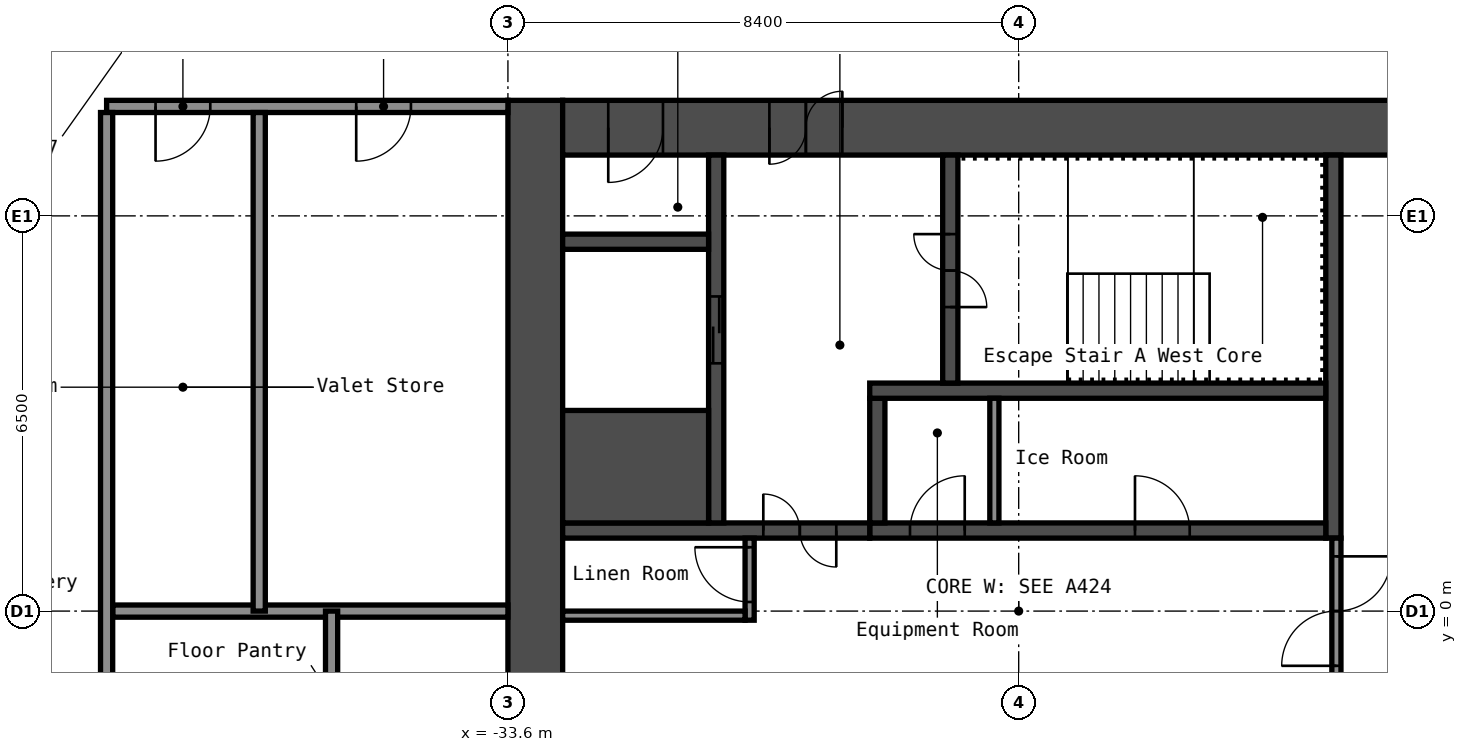
"""IFC4 building model, lengths in metres.
Left out: names, types, materials, properties, quantities, classifications, styles, units other than length and angle.
Written with IfcOpenShell. Run it as: python <this file> out.ifc"""

import sys

from ifc_helpers import new_model, si_unit, direction, frame, frame_2d, origin, place, context, subcontext, project, spatial, rectangle, extrude, element, fill, save


model = new_model("IFC4")
c1 = context("Model", 3, precision=1e-05, world=origin(), true_north=direction((0.0, 1.0)))
c2 = subcontext(c1, "Body", "Model", "MODEL_VIEW")
j1 = project(units=[si_unit("LENGTHUNIT", "METRE"), si_unit("PLANEANGLEUNIT", "RADIAN")], contexts=[c1])
p1 = place(None, origin())
s1 = spatial("IfcSite", under=j1, at=p1, CompositionType="ELEMENT")
p2 = place(p1, origin())
s2 = spatial("IfcBuilding", under=s1, at=p2, CompositionType="ELEMENT")
p3 = place(p2, frame((0.0, 0.0, 169.4)))
s3 = spatial("IfcBuildingStorey", under=s2, at=p3, CompositionType="ELEMENT", Elevation=169.4)
p4 = place(p3, frame((-33.15, -8.4, 0.0), z_axis=(0.0, 0.0, 1.0), x_axis=(0.0, 1.0, 0.0)))
e1 = element("IfcWall", 1, at=p4, inside=s3, PredefinedType="SHEAR", context=c2, shape_type="SweptSolid", body=[
    extrude(rectangle(XDim=16.8, YDim=0.9, at=frame_2d((8.4, 0.0))), origin(), (0.0, 0.0, 1.0), 2.75),
])
p5 = place(p3, frame((-32.7, 7.95, 0.0), z_axis=(0.0, 0.0, 1.0), x_axis=(1.0, 0.0, 0.0)))
e2 = element("IfcWall", 2, at=p5, inside=s3, PredefinedType="SHEAR", context=c2, shape_type="SweptSolid", body=[
    extrude(rectangle(XDim=15.0, YDim=0.9, at=frame_2d((7.5, 0.0))), origin(), (0.0, 0.0, 1.0), 2.75),
])
p6 = place(p5, frame((3.4, 0.0, 0.0)))
e3 = element("IfcOpeningElement", 3, at=p6, cuts=e2, PredefinedType="OPENING", context=c2, shape_type="SweptSolid", body=[
    extrude(rectangle(XDim=1.2, YDim=2.1, at=frame_2d((0.6, 1.05))), frame((0.0, 0.46, 0.0), z_axis=(0.0, -1.0, 0.0), x_axis=(1.0, 0.0, 0.0)), (0.0, 0.0, 1.0), 0.92),
])
p7 = place(p5, frame((0.75, 0.0, 0.0)))
e4 = element("IfcOpeningElement", 4, at=p7, cuts=e2, PredefinedType="OPENING", context=c2, shape_type="SweptSolid", body=[
    extrude(rectangle(XDim=0.9, YDim=2.1, at=frame_2d((0.45, 1.05))), frame((0.0, 0.46, 0.0), z_axis=(0.0, -1.0, 0.0), x_axis=(1.0, 0.0, 0.0)), (0.0, 0.0, 1.0), 0.92),
])
p8 = place(p3, frame((-20.025, 1.2, 0.0), z_axis=(0.0, 0.0, 1.0), x_axis=(0.0, 1.0, 0.0)))
e5 = element("IfcWall", 5, at=p8, inside=s3, PredefinedType="SHEAR", context=c2, shape_type="SweptSolid", body=[
    extrude(rectangle(XDim=6.3, YDim=0.25, at=frame_2d((3.15, 0.0))), origin(), (0.0, 0.0, 1.0), 2.75),
])
p9 = place(p3, frame((-27.65, 1.325, 0.0), z_axis=(0.0, 0.0, 1.0), x_axis=(1.0, 0.0, 0.0)))
e6 = element("IfcWall", 6, at=p9, inside=s3, PredefinedType="SHEAR", context=c2, shape_type="SweptSolid", body=[
    extrude(rectangle(XDim=7.5, YDim=0.25, at=frame_2d((3.75, 0.0))), origin(), (0.0, 0.0, 1.0), 2.75),
])
p10 = place(p9, frame((4.363, 0.0, 0.0)))
e7 = element("IfcOpeningElement", 7, at=p10, cuts=e6, PredefinedType="OPENING", context=c2, shape_type="SweptSolid", body=[
    extrude(rectangle(XDim=0.9, YDim=2.1, at=frame_2d((0.45, 1.05))), frame((0.0, 0.135, 0.0), z_axis=(0.0, -1.0, 0.0), x_axis=(1.0, 0.0, 0.0)), (0.0, 0.0, 1.0), 0.27),
])
p11 = place(p9, frame((0.663, 0.0, 0.0)))
e8 = element("IfcOpeningElement", 8, at=p11, cuts=e6, PredefinedType="OPENING", context=c2, shape_type="SweptSolid", body=[
    extrude(rectangle(XDim=0.9, YDim=2.1, at=frame_2d((0.45, 1.05))), frame((0.0, 0.135, 0.0), z_axis=(0.0, -1.0, 0.0), x_axis=(1.0, 0.0, 0.0)), (0.0, 0.0, 1.0), 0.27),
])
p12 = place(p3, frame((-27.525, 1.45, 0.0), z_axis=(0.0, 0.0, 1.0), x_axis=(0.0, 1.0, 0.0)))
e9 = element("IfcWall", 9, at=p12, inside=s3, PredefinedType="SHEAR", context=c2, shape_type="SweptSolid", body=[
    extrude(rectangle(XDim=2.05, YDim=0.25, at=frame_2d((1.025, 0.0))), origin(), (0.0, 0.0, 1.0), 2.75),
])
p13 = place(p3, frame((-27.65, 3.625, 0.0), z_axis=(0.0, 0.0, 1.0), x_axis=(1.0, 0.0, 0.0)))
e10 = element("IfcWall", 10, at=p13, inside=s3, PredefinedType="SHEAR", context=c2, shape_type="SweptSolid", body=[
    extrude(rectangle(XDim=7.5, YDim=0.25, at=frame_2d((3.75, 0.0))), origin(), (0.0, 0.0, 1.0), 2.75),
])
p14 = place(p3, frame((-26.325, 3.75, 0.0), z_axis=(0.0, 0.0, 1.0), x_axis=(0.0, 1.0, 0.0)))
e11 = element("IfcWall", 11, at=p14, inside=s3, PredefinedType="SHEAR", context=c2, shape_type="SweptSolid", body=[
    extrude(rectangle(XDim=3.75, YDim=0.25, at=frame_2d((1.875, 0.0))), origin(), (0.0, 0.0, 1.0), 2.75),
])
p15 = place(p14, frame((1.25, 0.0, 0.0)))
e12 = element("IfcOpeningElement", 12, at=p15, cuts=e11, PredefinedType="OPENING", context=c2, shape_type="SweptSolid", body=[
    extrude(rectangle(XDim=1.2, YDim=2.1, at=frame_2d((0.6, 1.05))), frame((0.0, 0.135, 0.0), z_axis=(0.0, -1.0, 0.0), x_axis=(1.0, 0.0, 0.0)), (0.0, 0.0, 1.0), 0.27),
])
p16 = place(p3, frame((-32.7, 1.325, 0.0), z_axis=(0.0, 0.0, 1.0), x_axis=(1.0, 0.0, 0.0)))
e13 = element("IfcWall", 13, at=p16, inside=s3, PredefinedType="SHEAR", context=c2, shape_type="SweptSolid", body=[
    extrude(rectangle(XDim=5.05, YDim=0.25, at=frame_2d((2.525, 0.0))), origin(), (0.0, 0.0, 1.0), 2.75),
])
p17 = place(p16, frame((3.3, 0.0, 0.0)))
e14 = element("IfcOpeningElement", 14, at=p17, cuts=e13, PredefinedType="OPENING", context=c2, shape_type="SweptSolid", body=[
    extrude(rectangle(XDim=1.2, YDim=2.1, at=frame_2d((0.6, 1.05))), frame((0.0, 0.135, 0.0), z_axis=(0.0, -1.0, 0.0), x_axis=(1.0, 0.0, 0.0)), (0.0, 0.0, 1.0), 0.27),
])
p18 = place(p3, frame((-30.175, 1.45, 0.0), z_axis=(0.0, 0.0, 1.0), x_axis=(0.0, 1.0, 0.0)))
e15 = element("IfcWall", 15, at=p18, inside=s3, PredefinedType="SHEAR", context=c2, shape_type="SweptSolid", body=[
    extrude(rectangle(XDim=6.05, YDim=0.25, at=frame_2d((3.025, 0.0))), origin(), (0.0, 0.0, 1.0), 2.75),
])
p19 = place(p18, frame((2.625, 0.0, 0.0)))
e16 = element("IfcOpeningElement", 16, at=p19, cuts=e15, PredefinedType="OPENING", context=c2, shape_type="SweptSolid", body=[
    extrude(rectangle(XDim=1.1, YDim=2.1, at=frame_2d((0.55, 1.05))), frame((0.0, 0.135, 0.0), z_axis=(0.0, -1.0, 0.0), x_axis=(1.0, 0.0, 0.0)), (0.0, 0.0, 1.0), 0.27),
])
p20 = place(p3, frame((-32.7, 2.375, 0.0), z_axis=(0.0, 0.0, 1.0), x_axis=(1.0, 0.0, 0.0)))
e17 = element("IfcWall", 17, at=p20, inside=s3, PredefinedType="SHEAR", context=c2, shape_type="SweptSolid", body=[
    extrude(rectangle(XDim=2.4, YDim=1.85, at=frame_2d((1.2, 0.0))), origin(), (0.0, 0.0, 1.0), 2.75),
])
p21 = place(p3, frame((-32.7, 6.075, 0.0), z_axis=(0.0, 0.0, 1.0), x_axis=(1.0, 0.0, 0.0)))
e18 = element("IfcWall", 18, at=p21, inside=s3, PredefinedType="SHEAR", context=c2, shape_type="SweptSolid", body=[
    extrude(rectangle(XDim=2.4, YDim=0.25, at=frame_2d((1.2, 0.0))), origin(), (0.0, 0.0, 1.0), 2.75),
])
p22 = place(p3, frame((-19.975, -1.2, 0.0), z_axis=(0.0, 0.0, 1.0), x_axis=(0.0, 1.0, 0.0)))
e19 = element("IfcWall", 19, at=p22, inside=s3, PredefinedType="PARTITIONING", context=c2, shape_type="SweptSolid", body=[
    extrude(rectangle(XDim=2.4, YDim=0.15, at=frame_2d((1.2, 0.0))), origin(), (0.0, 0.0, 1.0), 2.75),
])
p23 = place(p22, frame((0.3, 0.0, 0.0)))
e20 = element("IfcOpeningElement", 20, at=p23, cuts=e19, PredefinedType="OPENING", context=c2, shape_type="SweptSolid", body=[
    extrude(rectangle(XDim=1.8, YDim=2.1, at=frame_2d((0.9, 1.05))), frame((0.0, 0.085, 0.0), z_axis=(0.0, -1.0, 0.0), x_axis=(1.0, 0.0, 0.0)), (0.0, 0.0, 1.0), 0.17),
])
p24 = place(p3, frame((-29.625, -0.15, 0.0), z_axis=(0.0, 0.0, 1.0), x_axis=(0.0, 1.0, 0.0)))
e21 = element("IfcWall", 21, at=p24, inside=s3, PredefinedType="PARTITIONING", context=c2, shape_type="SweptSolid", body=[
    extrude(rectangle(XDim=1.35, YDim=0.15, at=frame_2d((0.675, 0.0))), origin(), (0.0, 0.0, 1.0), 2.75),
])
p25 = place(p24, frame((0.3, 0.0, 0.0)))
e22 = element("IfcOpeningElement", 22, at=p25, cuts=e21, PredefinedType="OPENING", context=c2, shape_type="SweptSolid", body=[
    extrude(rectangle(XDim=0.9, YDim=2.1, at=frame_2d((0.45, 1.05))), frame((0.0, 0.085, 0.0), z_axis=(0.0, -1.0, 0.0), x_axis=(1.0, 0.0, 0.0)), (0.0, 0.0, 1.0), 0.17),
])
p26 = place(p3, frame((-32.7, -0.075, 0.0), z_axis=(0.0, 0.0, 1.0), x_axis=(1.0, 0.0, 0.0)))
e23 = element("IfcWall", 23, at=p26, inside=s3, PredefinedType="PARTITIONING", context=c2, shape_type="SweptSolid", body=[
    extrude(rectangle(XDim=3.0, YDim=0.15, at=frame_2d((1.5, 0.0))), origin(), (0.0, 0.0, 1.0), 2.75),
])
p27 = place(p3, frame((-25.6, 1.45, 0.0), z_axis=(0.0, 0.0, 1.0), x_axis=(0.0, 1.0, 0.0)))
e24 = element("IfcWall", 24, at=p27, inside=s3, PredefinedType="PARTITIONING", context=c2, shape_type="SweptSolid", body=[
    extrude(rectangle(XDim=2.05, YDim=0.15, at=frame_2d((1.025, 0.0))), origin(), (0.0, 0.0, 1.0), 2.75),
])
p28 = place(p3, frame((-40.1, 0.0, 0.0), z_axis=(0.0, 0.0, 1.0), x_axis=(1.0, 0.0, 0.0)))
e25 = element("IfcWall", 25, at=p28, inside=s3, PredefinedType="PARTITIONING", context=c2, shape_type="SweptSolid", body=[
    extrude(rectangle(XDim=6.5, YDim=0.2, at=frame_2d((3.25, 0.0))), origin(), (0.0, 0.0, 1.0), 2.75),
])
p29 = place(p3, frame((-40.2, 8.3, 0.0), z_axis=(0.0, 0.0, 1.0), x_axis=(1.0, 0.0, 0.0)))
e26 = element("IfcWall", 26, at=p29, inside=s3, PredefinedType="PARTITIONING", context=c2, shape_type="SweptSolid", body=[
    extrude(rectangle(XDim=6.6, YDim=0.2, at=frame_2d((3.3, 0.0))), origin(), (0.0, 0.0, 1.0), 2.75),
])
p30 = place(p29, frame((0.805, 0.0, 0.0)))
e27 = element("IfcOpeningElement", 27, at=p30, cuts=e26, PredefinedType="OPENING", context=c2, shape_type="SweptSolid", body=[
    extrude(rectangle(XDim=0.9, YDim=2.1, at=frame_2d((0.45, 1.05))), frame((0.0, 0.11, 0.0), z_axis=(0.0, -1.0, 0.0), x_axis=(1.0, 0.0, 0.0)), (0.0, 0.0, 1.0), 0.22),
])
p31 = place(p29, frame((4.105, 0.0, 0.0)))
e28 = element("IfcOpeningElement", 28, at=p31, cuts=e26, PredefinedType="OPENING", context=c2, shape_type="SweptSolid", body=[
    extrude(rectangle(XDim=0.9, YDim=2.1, at=frame_2d((0.45, 1.05))), frame((0.0, 0.11, 0.0), z_axis=(0.0, -1.0, 0.0), x_axis=(1.0, 0.0, 0.0)), (0.0, 0.0, 1.0), 0.22),
])
p32 = place(p3, frame((-40.2, -8.2, 0.0), z_axis=(0.0, 0.0, 1.0), x_axis=(0.0, 1.0, 0.0)))
e29 = element("IfcWall", 29, at=p32, inside=s3, PredefinedType="PARTITIONING", context=c2, shape_type="SweptSolid", body=[
    extrude(rectangle(XDim=16.4, YDim=0.2, at=frame_2d((8.2, 0.0))), origin(), (0.0, 0.0, 1.0), 2.75),
])
for number, where, z_axis, x_axis in (
    (30, (-37.69, 0.0, 0.0), (0.0, 0.0, 1.0), (0.0, 1.0, 0.0)),
    (31, (-36.5, -8.2, 0.0), (0.0, 0.0, 1.0), (0.0, 1.0, 0.0)),
):
    element("IfcWall", number, at=place(p3, frame(where, z_axis=z_axis, x_axis=x_axis)), inside=s3, PredefinedType="PARTITIONING", context=c2, shape_type="SweptSolid", body=[
        extrude(rectangle(XDim=8.2, YDim=0.2, at=frame_2d((4.1, 0.0))), origin(), (0.0, 0.0, 1.0), 2.75),
    ])
p33 = place(p6, origin())
e32 = element("IfcDoor", 32, at=p33, inside=s3, OperationType="DOUBLE_DOOR_SINGLE_SWING", PredefinedType="DOOR", context=c2, shape_type="SweptSolid", body=[
    extrude(rectangle(XDim=1.2, YDim=2.1, at=frame_2d((0.6, 1.05))), frame((0.0, 0.025, 0.0), z_axis=(0.0, -1.0, 0.0), x_axis=(1.0, 0.0, 0.0)), (0.0, 0.0, 1.0), 0.05),
])
fill(e3, e32)
p34 = place(p7, origin())
e33 = element("IfcDoor", 33, at=p34, inside=s3, OperationType="SINGLE_SWING_LEFT", PredefinedType="DOOR", context=c2, shape_type="SweptSolid", body=[
    extrude(rectangle(XDim=0.9, YDim=2.1, at=frame_2d((0.45, 1.05))), frame((0.0, 0.025, 0.0), z_axis=(0.0, -1.0, 0.0), x_axis=(1.0, 0.0, 0.0)), (0.0, 0.0, 1.0), 0.05),
])
fill(e4, e33)
p35 = place(p15, origin())
e34 = element("IfcDoor", 34, at=p35, inside=s3, OperationType="DOUBLE_DOOR_SINGLE_SWING", PredefinedType="DOOR", context=c2, shape_type="SweptSolid", body=[
    extrude(rectangle(XDim=1.2, YDim=2.1, at=frame_2d((0.6, 1.05))), frame((0.0, 0.025, 0.0), z_axis=(0.0, -1.0, 0.0), x_axis=(1.0, 0.0, 0.0)), (0.0, 0.0, 1.0), 0.05),
])
fill(e12, e34)
p36 = place(p17, origin())
e35 = element("IfcDoor", 35, at=p36, inside=s3, OperationType="DOUBLE_DOOR_SINGLE_SWING", PredefinedType="DOOR", context=c2, shape_type="SweptSolid", body=[
    extrude(rectangle(XDim=1.2, YDim=2.1, at=frame_2d((0.6, 1.05))), frame((0.0, 0.025, 0.0), z_axis=(0.0, -1.0, 0.0), x_axis=(1.0, 0.0, 0.0)), (0.0, 0.0, 1.0), 0.05),
])
fill(e14, e35)
p37 = place(p23, origin())
e36 = element("IfcDoor", 36, at=p37, inside=s3, OperationType="DOUBLE_DOOR_SINGLE_SWING", PredefinedType="DOOR", context=c2, shape_type="SweptSolid", body=[
    extrude(rectangle(XDim=1.8, YDim=2.1, at=frame_2d((0.9, 1.05))), frame((0.0, 0.025, 0.0), z_axis=(0.0, -1.0, 0.0), x_axis=(1.0, 0.0, 0.0)), (0.0, 0.0, 1.0), 0.05),
])
fill(e20, e36)
p38 = place(p25, origin())
e37 = element("IfcDoor", 37, at=p38, inside=s3, OperationType="SINGLE_SWING_LEFT", PredefinedType="DOOR", context=c2, shape_type="SweptSolid", body=[
    extrude(rectangle(XDim=0.9, YDim=2.1, at=frame_2d((0.45, 1.05))), frame((0.0, 0.025, 0.0), z_axis=(0.0, -1.0, 0.0), x_axis=(1.0, 0.0, 0.0)), (0.0, 0.0, 1.0), 0.05),
])
fill(e22, e37)
p39 = place(p10, origin())
e38 = element("IfcDoor", 38, at=p39, inside=s3, OperationType="SINGLE_SWING_RIGHT", PredefinedType="DOOR", context=c2, shape_type="SweptSolid", body=[
    extrude(rectangle(XDim=0.9, YDim=2.1, at=frame_2d((0.45, 1.05))), frame((0.0, 0.025, 0.0), z_axis=(0.0, -1.0, 0.0), x_axis=(1.0, 0.0, 0.0)), (0.0, 0.0, 1.0), 0.05),
])
fill(e7, e38)
p40 = place(p11, origin())
e39 = element("IfcDoor", 39, at=p40, inside=s3, OperationType="SINGLE_SWING_LEFT", PredefinedType="DOOR", context=c2, shape_type="SweptSolid", body=[
    extrude(rectangle(XDim=0.9, YDim=2.1, at=frame_2d((0.45, 1.05))), frame((0.0, 0.025, 0.0), z_axis=(0.0, -1.0, 0.0), x_axis=(1.0, 0.0, 0.0)), (0.0, 0.0, 1.0), 0.05),
])
fill(e8, e39)
p41 = place(p19, origin())
e40 = element("IfcDoor", 40, at=p41, inside=s3, OperationType="DOUBLE_DOOR_SLIDING", PredefinedType="DOOR", context=c2, shape_type="SweptSolid", body=[
    extrude(rectangle(XDim=1.1, YDim=2.1, at=frame_2d((0.55, 1.05))), frame((0.0, 0.025, 0.0), z_axis=(0.0, -1.0, 0.0), x_axis=(1.0, 0.0, 0.0)), (0.0, 0.0, 1.0), 0.05),
])
fill(e16, e40)
p42 = place(p30, origin())
e41 = element("IfcDoor", 41, at=p42, inside=s3, OperationType="SINGLE_SWING_LEFT", PredefinedType="DOOR", context=c2, shape_type="SweptSolid", body=[
    extrude(rectangle(XDim=0.9, YDim=2.1, at=frame_2d((0.45, 1.05))), frame((0.0, 0.025, 0.0), z_axis=(0.0, -1.0, 0.0), x_axis=(1.0, 0.0, 0.0)), (0.0, 0.0, 1.0), 0.05),
])
fill(e27, e41)
p43 = place(p31, origin())
e42 = element("IfcDoor", 42, at=p43, inside=s3, OperationType="SINGLE_SWING_LEFT", PredefinedType="DOOR", context=c2, shape_type="SweptSolid", body=[
    extrude(rectangle(XDim=0.9, YDim=2.1, at=frame_2d((0.45, 1.05))), frame((0.0, 0.025, 0.0), z_axis=(0.0, -1.0, 0.0), x_axis=(1.0, 0.0, 0.0)), (0.0, 0.0, 1.0), 0.05),
])
fill(e28, e42)
save(model, sys.argv[1])
